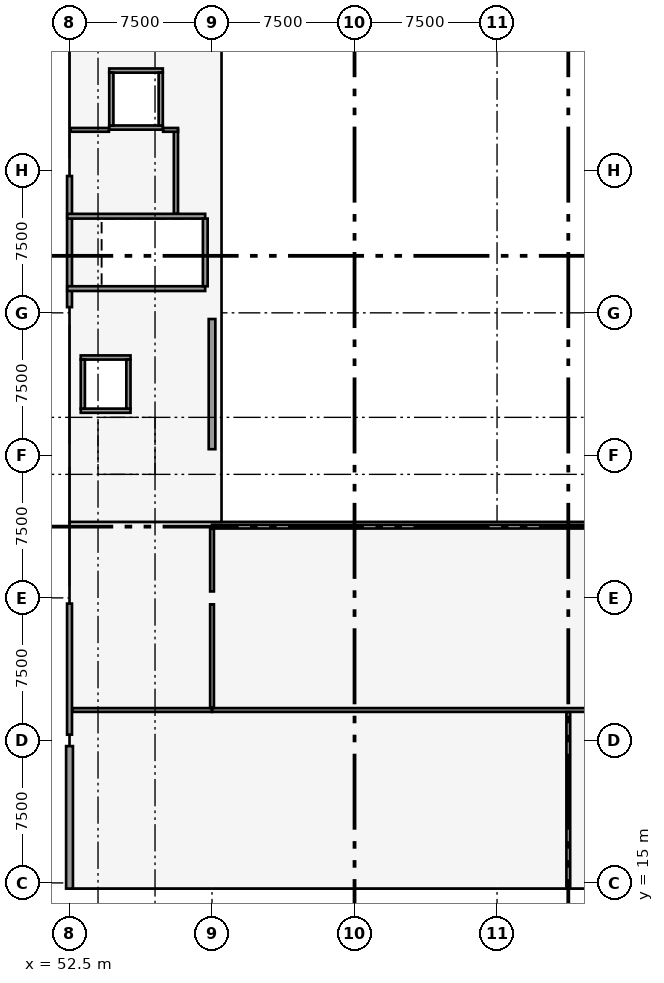
"""IFC4 building model, lengths in metres.
Left out: names, types, materials, properties, quantities, classifications, styles, units other than length and angle.
Written with IfcOpenShell. Run it as: python <this file> out.ifc"""

import sys

from ifc_helpers import new_model, si_unit, direction, frame, frame_2d, origin, origin_2d, place, context, subcontext, project, spatial, rectangle, extrude, element, fill, save


model = new_model("IFC4")
c1 = context("Model", 3, precision=1e-05, world=origin(), true_north=direction((0.0, 1.0)))
c2 = subcontext(c1, "Body", "Model", "MODEL_VIEW")
j1 = project(units=[si_unit("LENGTHUNIT", "METRE"), si_unit("PLANEANGLEUNIT", "RADIAN")], contexts=[c1])
p1 = place(None, origin())
s1 = spatial("IfcSite", under=j1, at=p1, CompositionType="ELEMENT")
p2 = place(p1, origin())
s2 = spatial("IfcBuilding", under=s1, at=p2, CompositionType="ELEMENT")
p3 = place(p2, frame((0.0, 0.0, 21.0)))
s3 = spatial("IfcBuildingStorey", under=s2, at=p3, CompositionType="ELEMENT", Elevation=21.0)
p4 = place(p3, frame((52.5, 22.5, 0.0), z_axis=(0.0, 0.0, 1.0), x_axis=(1.0, 0.0, 0.0)))
e1 = element("IfcColumn", 1, at=p4, inside=s3, PredefinedType="COLUMN", context=c2, shape_type="SweptSolid", body=[
    extrude(rectangle(XDim=0.6, YDim=1.1, at=origin_2d()), origin(), (0.0, 0.0, 1.0), 4.2),
])
for number, where, z_axis, x_axis in (
    (2, (52.5, 30.0, 0.0), (0.0, 0.0, 1.0), (1.0, 0.0, 0.0)),
    (3, (52.5, 37.5, 0.0), (0.0, 0.0, 1.0), (1.0, 0.0, 0.0)),
    (4, (52.5, 45.0, 0.0), (0.0, 0.0, 1.0), (1.0, 0.0, 0.0)),
    (5, (52.5, 52.5, 0.0), (0.0, 0.0, 1.0), (1.0, 0.0, 0.0)),
    (6, (60.0, 22.5, 0.0), (0.0, 0.0, 1.0), (1.0, 0.0, 0.0)),
    (7, (60.0, 30.0, 0.0), (0.0, 0.0, 1.0), (1.0, 0.0, 0.0)),
    (8, (60.0, 37.5, 0.0), (0.0, 0.0, 1.0), (1.0, 0.0, 0.0)),
    (9, (60.0, 45.0, 0.0), (0.0, 0.0, 1.0), (1.0, 0.0, 0.0)),
    (10, (60.0, 52.5, 0.0), (0.0, 0.0, 1.0), (1.0, 0.0, 0.0)),
    (11, (75.0, 22.5, 0.0), (0.0, 0.0, 1.0), (1.0, 0.0, 0.0)),
    (12, (75.0, 30.0, 0.0), (0.0, 0.0, 1.0), (1.0, 0.0, 0.0)),
):
    element("IfcColumn", number, at=place(p3, frame(where, z_axis=z_axis, x_axis=x_axis)), inside=s3, PredefinedType="COLUMN", context=c2, shape_type="SweptSolid", body=[
        extrude(rectangle(XDim=0.65, YDim=0.65, at=origin_2d()), origin(), (0.0, 0.0, 1.0), 4.2),
    ])
p5 = place(p3, frame((60.0, 37.825, 0.0), z_axis=(0.0, 0.0, 1.0), x_axis=(0.0, 1.0, 0.0)))
e13 = element("IfcWall", 13, at=p5, inside=s3, PredefinedType="SHEAR", context=c2, shape_type="SweptSolid", body=[
    extrude(rectangle(XDim=6.85, YDim=0.35, at=frame_2d((3.425, 0.0))), origin(), (0.0, 0.0, 1.0), 2.72),
])
p6 = place(p3, frame((52.5, 14.7, 0.0), z_axis=(0.0, 0.0, 1.0), x_axis=(0.0, 1.0, 0.0)))
e14 = element("IfcWall", 14, at=p6, inside=s3, PredefinedType="SOLIDWALL", context=c2, shape_type="SweptSolid", body=[
    extrude(rectangle(XDim=7.5, YDim=0.36, at=frame_2d((3.75, 0.0))), origin(), (0.0, 0.0, 1.0), 3.32),
])
p7 = place(p3, frame((52.5, 22.8, 0.0), z_axis=(0.0, 0.0, 1.0), x_axis=(0.0, 1.0, 0.0)))
e15 = element("IfcWall", 15, at=p7, inside=s3, PredefinedType="SOLIDWALL", context=c2, shape_type="SweptSolid", body=[
    extrude(rectangle(XDim=6.9, YDim=0.26, at=frame_2d((3.45, 0.0))), origin(), (0.0, 0.0, 1.0), 2.94),
])
p8 = place(p3, frame((52.5, 45.3, 0.0), z_axis=(0.0, 0.0, 1.0), x_axis=(0.0, 1.0, 0.0)))
e16 = element("IfcWall", 16, at=p8, inside=s3, PredefinedType="SOLIDWALL", context=c2, shape_type="SweptSolid", body=[
    extrude(rectangle(XDim=6.9, YDim=0.26, at=frame_2d((3.45, 0.0))), origin(), (0.0, 0.0, 1.0), 2.99),
])
p9 = place(p3, frame((52.38, 46.275, 0.0), z_axis=(0.0, 0.0, 1.0), x_axis=(1.0, 0.0, 0.0)))
e17 = element("IfcWall", 17, at=p9, inside=s3, PredefinedType="SOLIDWALL", context=c2, shape_type="SweptSolid", body=[
    extrude(rectangle(XDim=7.26, YDim=0.25, at=frame_2d((3.63, 0.0))), origin(), (0.0, 0.0, 1.0), 3.92),
])
p10 = place(p9, frame((0.62, 0.0, 0.0)))
e18 = element("IfcOpeningElement", 18, at=p10, cuts=e17, PredefinedType="OPENING", context=c2, shape_type="SweptSolid", body=[
    extrude(rectangle(XDim=1.1, YDim=2.15, at=frame_2d((0.55, 1.075))), frame((0.0, 0.135, 0.0), z_axis=(0.0, -1.0, 0.0), x_axis=(1.0, 0.0, 0.0)), (0.0, 0.0, 1.0), 0.27),
])
p11 = place(p3, frame((52.38, 50.085, 0.0), z_axis=(0.0, 0.0, 1.0), x_axis=(1.0, 0.0, 0.0)))
e19 = element("IfcWall", 19, at=p11, inside=s3, PredefinedType="SOLIDWALL", context=c2, shape_type="SweptSolid", body=[
    extrude(rectangle(XDim=7.26, YDim=0.25, at=frame_2d((3.63, 0.0))), origin(), (0.0, 0.0, 1.0), 3.92),
])
p12 = place(p11, frame((0.62, 0.0, 0.0)))
e20 = element("IfcOpeningElement", 20, at=p12, cuts=e19, PredefinedType="OPENING", context=c2, shape_type="SweptSolid", body=[
    extrude(rectangle(XDim=1.1, YDim=2.15, at=frame_2d((0.55, 1.075))), frame((0.0, 0.135, 0.0), z_axis=(0.0, -1.0, 0.0), x_axis=(1.0, 0.0, 0.0)), (0.0, 0.0, 1.0), 0.27),
])
p13 = place(p3, frame((59.645, 46.4, 0.0), z_axis=(0.0, 0.0, 1.0), x_axis=(0.0, 1.0, 0.0)))
e21 = element("IfcWall", 21, at=p13, inside=s3, PredefinedType="SOLIDWALL", context=c2, shape_type="SweptSolid", body=[
    extrude(rectangle(XDim=3.56, YDim=0.25, at=frame_2d((1.78, 0.0))), origin(), (0.0, 0.0, 1.0), 3.92),
])
for number, where, z_axis, x_axis in (
    (22, (53.09, 39.85, 0.0), (0.0, 0.0, 1.0), (1.0, 0.0, 0.0)),
    (23, (53.09, 42.65, 0.0), (0.0, 0.0, 1.0), (1.0, 0.0, 0.0)),
):
    element("IfcWall", number, at=place(p3, frame(where, z_axis=z_axis, x_axis=x_axis)), inside=s3, PredefinedType="SOLIDWALL", context=c2, shape_type="SweptSolid", body=[
        extrude(rectangle(XDim=2.62, YDim=0.22, at=frame_2d((1.31, 0.0))), origin(), (0.0, 0.0, 1.0), 3.92),
    ])
p14 = place(p3, frame((53.2, 39.96, 0.0), z_axis=(0.0, 0.0, 1.0), x_axis=(0.0, 1.0, 0.0)))
e24 = element("IfcWall", 24, at=p14, inside=s3, PredefinedType="SOLIDWALL", context=c2, shape_type="SweptSolid", body=[
    extrude(rectangle(XDim=2.58, YDim=0.22, at=frame_2d((1.29, 0.0))), origin(), (0.0, 0.0, 1.0), 3.92),
])
p15 = place(p3, frame((55.6, 39.96, 0.0), z_axis=(0.0, 0.0, 1.0), x_axis=(0.0, 1.0, 0.0)))
e25 = element("IfcWall", 25, at=p15, inside=s3, PredefinedType="SOLIDWALL", context=c2, shape_type="SweptSolid", body=[
    extrude(rectangle(XDim=2.58, YDim=0.22, at=frame_2d((1.29, 0.0))), origin(), (0.0, 0.0, 1.0), 3.92),
])
p16 = place(p15, frame((0.79, 0.0, 0.0)))
e26 = element("IfcOpeningElement", 26, at=p16, cuts=e25, PredefinedType="OPENING", context=c2, shape_type="SweptSolid", body=[
    extrude(rectangle(XDim=1.0, YDim=2.15, at=frame_2d((0.5, 1.075))), frame((0.0, 0.12, 0.0), z_axis=(0.0, -1.0, 0.0), x_axis=(1.0, 0.0, 0.0)), (0.0, 0.0, 1.0), 0.24),
])
p17 = place(p3, frame((54.59, 54.75, 0.0), z_axis=(0.0, 0.0, 1.0), x_axis=(1.0, 0.0, 0.0)))
e27 = element("IfcWall", 27, at=p17, inside=s3, PredefinedType="SOLIDWALL", context=c2, shape_type="SweptSolid", body=[
    extrude(rectangle(XDim=2.82, YDim=0.22, at=frame_2d((1.41, 0.0))), origin(), (0.0, 0.0, 1.0), 3.92),
])
p18 = place(p17, frame((0.86, 0.0, 0.0)))
e28 = element("IfcOpeningElement", 28, at=p18, cuts=e27, PredefinedType="OPENING", context=c2, shape_type="SweptSolid", body=[
    extrude(rectangle(XDim=1.1, YDim=2.15, at=frame_2d((0.55, 1.075))), frame((0.0, 0.12, 0.0), z_axis=(0.0, -1.0, 0.0), x_axis=(1.0, 0.0, 0.0)), (0.0, 0.0, 1.0), 0.24),
])
p19 = place(p3, frame((54.59, 57.75, 0.0), z_axis=(0.0, 0.0, 1.0), x_axis=(1.0, 0.0, 0.0)))
e29 = element("IfcWall", 29, at=p19, inside=s3, PredefinedType="SOLIDWALL", context=c2, shape_type="SweptSolid", body=[
    extrude(rectangle(XDim=2.82, YDim=0.22, at=frame_2d((1.41, 0.0))), origin(), (0.0, 0.0, 1.0), 3.92),
])
for number, where, z_axis, x_axis in (
    (30, (54.7, 54.86, 0.0), (0.0, 0.0, 1.0), (0.0, 1.0, 0.0)),
    (31, (57.3, 54.86, 0.0), (0.0, 0.0, 1.0), (0.0, 1.0, 0.0)),
):
    element("IfcWall", number, at=place(p3, frame(where, z_axis=z_axis, x_axis=x_axis)), inside=s3, PredefinedType="SOLIDWALL", context=c2, shape_type="SweptSolid", body=[
        extrude(rectangle(XDim=2.78, YDim=0.22, at=frame_2d((1.39, 0.0))), origin(), (0.0, 0.0, 1.0), 3.92),
    ])
p20 = place(p3, frame((58.1, 50.22, 0.0), z_axis=(0.0, 0.0, 1.0), x_axis=(0.0, 1.0, 0.0)))
e32 = element("IfcWall", 32, at=p20, inside=s3, PredefinedType="SOLIDWALL", context=c2, shape_type="SweptSolid", body=[
    extrude(rectangle(XDim=4.41, YDim=0.22, at=frame_2d((2.205, 0.0))), origin(), (0.0, 0.0, 1.0), 3.92),
])
p21 = place(p20, frame((0.45, 0.0, 0.0)))
e33 = element("IfcOpeningElement", 33, at=p21, cuts=e32, PredefinedType="OPENING", context=c2, shape_type="SweptSolid", body=[
    extrude(rectangle(XDim=1.1, YDim=2.15, at=frame_2d((0.55, 1.075))), frame((0.0, 0.12, 0.0), z_axis=(0.0, -1.0, 0.0), x_axis=(1.0, 0.0, 0.0)), (0.0, 0.0, 1.0), 0.24),
])
p22 = place(p3, frame((52.56, 54.63, 0.0), z_axis=(0.0, 0.0, 1.0), x_axis=(1.0, 0.0, 0.0)))
e34 = element("IfcWall", 34, at=p22, inside=s3, PredefinedType="PARTITIONING", context=c2, shape_type="SweptSolid", body=[
    extrude(rectangle(XDim=2.015, YDim=0.2, at=frame_2d((1.007, 0.0))), origin(), (0.0, 0.0, 1.0), 3.48),
])
p23 = place(p3, frame((57.425, 54.63, 0.0), z_axis=(0.0, 0.0, 1.0), x_axis=(1.0, 0.0, 0.0)))
e35 = element("IfcWall", 35, at=p23, inside=s3, PredefinedType="PARTITIONING", context=c2, shape_type="SweptSolid", body=[
    extrude(rectangle(XDim=0.785, YDim=0.2, at=frame_2d((0.393, 0.0))), origin(), (0.0, 0.0, 1.0), 3.9),
])
p24 = place(p3, frame((52.644, 24.1, 0.0), z_axis=(0.0, 0.0, 1.0), x_axis=(1.0, 0.0, 0.0)))
e36 = element("IfcWall", 36, at=p24, inside=s3, PredefinedType="PARTITIONING", context=c2, shape_type="SweptSolid", body=[
    extrude(rectangle(XDim=7.356, YDim=0.2, at=frame_2d((3.678, 0.0))), origin(), (0.0, 0.0, 1.0), 2.69),
])
p25 = place(p24, frame((3.006, 0.0, 0.0)))
e37 = element("IfcOpeningElement", 37, at=p25, cuts=e36, PredefinedType="OPENING", context=c2, shape_type="SweptSolid", body=[
    extrude(rectangle(XDim=1.2, YDim=2.15, at=frame_2d((0.6, 1.075))), frame((0.0, 0.11, 0.0), z_axis=(0.0, -1.0, 0.0), x_axis=(1.0, 0.0, 0.0)), (0.0, 0.0, 1.0), 0.22),
])
for number, where, z_axis, x_axis in (
    (38, (60.0, 24.1, 0.0), (0.0, 0.0, 1.0), (1.0, 0.0, 0.0)),
    (39, (60.0, 33.75, 0.0), (0.0, 0.0, 1.0), (1.0, 0.0, 0.0)),
):
    element("IfcWall", number, at=place(p3, frame(where, z_axis=z_axis, x_axis=x_axis)), inside=s3, PredefinedType="PARTITIONING", context=c2, shape_type="SweptSolid", body=[
        extrude(rectangle(XDim=37.5, YDim=0.2, at=frame_2d((18.75, 0.0))), origin(), (0.0, 0.0, 1.0), 2.69),
    ])
p26 = place(p3, frame((78.75, 14.82, 0.0), z_axis=(0.0, 0.0, 1.0), x_axis=(0.0, 1.0, 0.0)))
e40 = element("IfcWall", 40, at=p26, inside=s3, PredefinedType="PARTITIONING", context=c2, shape_type="SweptSolid", body=[
    extrude(rectangle(XDim=9.166, YDim=0.2, at=frame_2d((4.583, 0.0))), origin(), (0.0, 0.0, 1.0), 2.99),
])
p27 = place(p26, frame((3.73, 0.0, 0.0)))
e41 = element("IfcOpeningElement", 41, at=p27, cuts=e40, PredefinedType="OPENING", context=c2, shape_type="SweptSolid", body=[
    extrude(rectangle(XDim=1.3, YDim=2.15, at=frame_2d((0.65, 1.075))), frame((0.0, 0.11, 0.0), z_axis=(0.0, -1.0, 0.0), x_axis=(1.0, 0.0, 0.0)), (0.0, 0.0, 1.0), 0.22),
])
p28 = place(p3, frame((60.0, 24.214, 0.0), z_axis=(0.0, 0.0, 1.0), x_axis=(0.0, 1.0, 0.0)))
e42 = element("IfcWall", 42, at=p28, inside=s3, PredefinedType="PARTITIONING", context=c2, shape_type="SweptSolid", body=[
    extrude(rectangle(XDim=5.447, YDim=0.2, at=frame_2d((2.723, 0.0))), origin(), (0.0, 0.0, 1.0), 2.69),
])
p29 = place(p28, frame((2.186, 0.0, 0.0)))
e43 = element("IfcOpeningElement", 43, at=p29, cuts=e42, PredefinedType="OPENING", context=c2, shape_type="SweptSolid", body=[
    extrude(rectangle(XDim=1.2, YDim=2.15, at=frame_2d((0.6, 1.075))), frame((0.0, 0.11, 0.0), z_axis=(0.0, -1.0, 0.0), x_axis=(1.0, 0.0, 0.0)), (0.0, 0.0, 1.0), 0.22),
])
p30 = place(p3, frame((60.0, 30.339, 0.0), z_axis=(0.0, 0.0, 1.0), x_axis=(0.0, 1.0, 0.0)))
e44 = element("IfcWall", 44, at=p30, inside=s3, PredefinedType="PARTITIONING", context=c2, shape_type="SweptSolid", body=[
    extrude(rectangle(XDim=3.297, YDim=0.2, at=frame_2d((1.648, 0.0))), origin(), (0.0, 0.0, 1.0), 2.69),
])
p31 = place(p10, origin())
e45 = element("IfcDoor", 45, at=p31, inside=s3, OperationType="SINGLE_SWING_LEFT", PredefinedType="DOOR", context=c2, shape_type="SweptSolid", body=[
    extrude(rectangle(XDim=1.1, YDim=2.15, at=frame_2d((0.55, 1.075))), frame((0.0, 0.025, 0.0), z_axis=(0.0, -1.0, 0.0), x_axis=(1.0, 0.0, 0.0)), (0.0, 0.0, 1.0), 0.05),
])
fill(e18, e45)
p32 = place(p12, frame((1.1, 0.0, 0.0), z_axis=(0.0, 0.0, 1.0), x_axis=(-1.0, 0.0, 0.0)))
e46 = element("IfcDoor", 46, at=p32, inside=s3, OperationType="SINGLE_SWING_RIGHT", PredefinedType="DOOR", context=c2, shape_type="SweptSolid", body=[
    extrude(rectangle(XDim=1.1, YDim=2.15, at=frame_2d((0.55, 1.075))), frame((0.0, 0.025, 0.0), z_axis=(0.0, -1.0, 0.0), x_axis=(1.0, 0.0, 0.0)), (0.0, 0.0, 1.0), 0.05),
])
fill(e20, e46)
p33 = place(p16, origin())
e47 = element("IfcDoor", 47, at=p33, inside=s3, OperationType="SLIDING_TO_LEFT", PredefinedType="DOOR", context=c2, shape_type="SweptSolid", body=[
    extrude(rectangle(XDim=1.0, YDim=2.15, at=frame_2d((0.5, 1.075))), frame((0.0, 0.025, 0.0), z_axis=(0.0, -1.0, 0.0), x_axis=(1.0, 0.0, 0.0)), (0.0, 0.0, 1.0), 0.05),
])
fill(e26, e47)
p34 = place(p18, origin())
e48 = element("IfcDoor", 48, at=p34, inside=s3, OperationType="SLIDING_TO_LEFT", PredefinedType="DOOR", context=c2, shape_type="SweptSolid", body=[
    extrude(rectangle(XDim=1.1, YDim=2.15, at=frame_2d((0.55, 1.075))), frame((0.0, 0.025, 0.0), z_axis=(0.0, -1.0, 0.0), x_axis=(1.0, 0.0, 0.0)), (0.0, 0.0, 1.0), 0.05),
])
fill(e28, e48)
p35 = place(p21, origin())
e49 = element("IfcDoor", 49, at=p35, inside=s3, OperationType="SINGLE_SWING_LEFT", PredefinedType="DOOR", context=c2, shape_type="SweptSolid", body=[
    extrude(rectangle(XDim=1.1, YDim=2.15, at=frame_2d((0.55, 1.075))), frame((0.0, 0.025, 0.0), z_axis=(0.0, -1.0, 0.0), x_axis=(1.0, 0.0, 0.0)), (0.0, 0.0, 1.0), 0.05),
])
fill(e33, e49)
p36 = place(p25, origin())
e50 = element("IfcDoor", 50, at=p36, inside=s3, OperationType="SINGLE_SWING_LEFT", PredefinedType="DOOR", context=c2, shape_type="SweptSolid", body=[
    extrude(rectangle(XDim=1.2, YDim=2.15, at=frame_2d((0.6, 1.075))), frame((0.0, 0.025, 0.0), z_axis=(0.0, -1.0, 0.0), x_axis=(1.0, 0.0, 0.0)), (0.0, 0.0, 1.0), 0.05),
])
fill(e37, e50)
p37 = place(p27, origin())
e51 = element("IfcDoor", 51, at=p37, inside=s3, OperationType="SINGLE_SWING_LEFT", PredefinedType="DOOR", context=c2, shape_type="SweptSolid", body=[
    extrude(rectangle(XDim=1.3, YDim=2.15, at=frame_2d((0.65, 1.075))), frame((0.0, 0.025, 0.0), z_axis=(0.0, -1.0, 0.0), x_axis=(1.0, 0.0, 0.0)), (0.0, 0.0, 1.0), 0.05),
])
fill(e41, e51)
p38 = place(p29, origin())
e52 = element("IfcDoor", 52, at=p38, inside=s3, OperationType="SINGLE_SWING_RIGHT", PredefinedType="DOOR", context=c2, shape_type="SweptSolid", body=[
    extrude(rectangle(XDim=1.2, YDim=2.15, at=frame_2d((0.6, 1.075))), frame((0.0, 0.025, 0.0), z_axis=(0.0, -1.0, 0.0), x_axis=(1.0, 0.0, 0.0)), (0.0, 0.0, 1.0), 0.05),
])
fill(e43, e52)
save(model, sys.argv[1])
